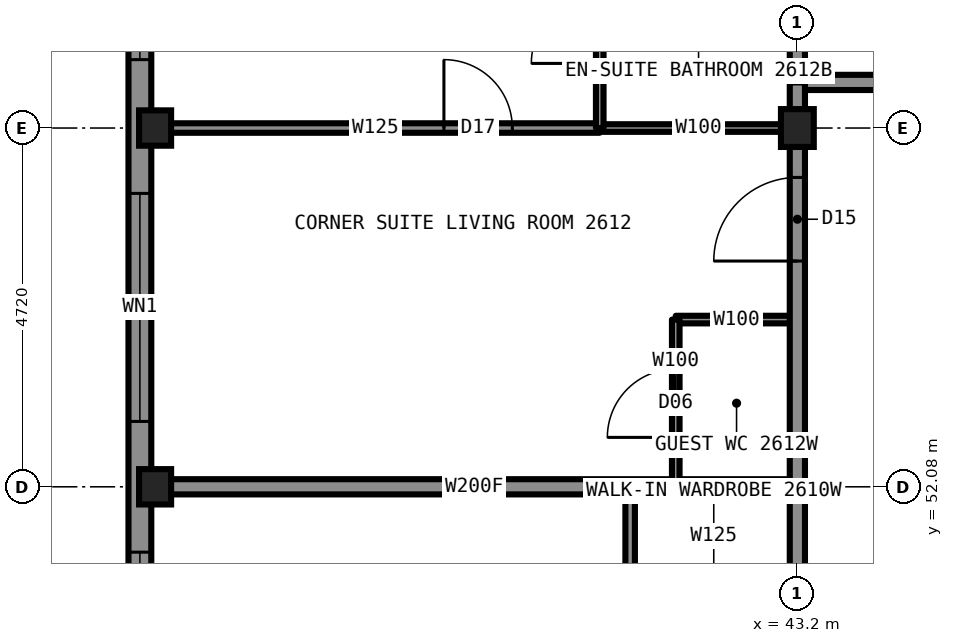
"""IFC4 building model, lengths in metres.
Left out: names, types, materials, properties, quantities, classifications, styles, units other than length and angle.
Written with IfcOpenShell. Run it as: python <this file> out.ifc"""

import sys

from ifc_helpers import new_model, si_unit, direction, frame, frame_2d, origin, origin_2d, place, context, subcontext, project, spatial, rectangle, i_section, extrude, element, fill, save


model = new_model("IFC4")
c1 = context("Model", 3, precision=1e-05, world=origin(), true_north=direction((0.0, 1.0)))
c2 = subcontext(c1, "Body", "Model", "MODEL_VIEW")
j1 = project(units=[si_unit("LENGTHUNIT", "METRE"), si_unit("PLANEANGLEUNIT", "RADIAN")], contexts=[c1])
p1 = place(None, origin())
s1 = spatial("IfcSite", under=j1, at=p1, CompositionType="ELEMENT")
p2 = place(p1, origin())
s2 = spatial("IfcBuilding", under=s1, at=p2, CompositionType="ELEMENT")
p3 = place(p2, frame((0.0, 0.0, 93.4)))
s3 = spatial("IfcBuildingStorey", under=s2, at=p3, CompositionType="ELEMENT", Elevation=93.4)
for number, where, z_axis, x_axis in (
    (1, (34.75, 52.08, 0.0), (0.0, 0.0, 1.0), (1.0, 0.0, 0.0)),
    (2, (34.75, 56.8, 0.0), (0.0, 0.0, 1.0), (1.0, 0.0, 0.0)),
):
    element("IfcColumn", number, at=place(p3, frame(where, z_axis=z_axis, x_axis=x_axis)), inside=s3, PredefinedType="COLUMN", context=c2, shape_type="SweptSolid", body=[
        extrude(i_section(OverallWidth=0.442, OverallDepth=0.531, WebThickness=0.066, FlangeThickness=0.106, at=origin_2d()), origin(), (0.0, 0.0, 1.0), 3.5),
    ])
p4 = place(p3, frame((43.2, 56.8, 0.0), z_axis=(0.0, 0.0, 1.0), x_axis=(1.0, 0.0, 0.0)))
e3 = element("IfcColumn", 3, at=p4, inside=s3, PredefinedType="COLUMN", context=c2, shape_type="SweptSolid", body=[
    extrude(i_section(OverallWidth=0.432, OverallDepth=0.498, WebThickness=0.056, FlangeThickness=0.089, at=origin_2d()), origin(), (0.0, 0.0, 1.0), 3.5),
])
p5 = place(p3, frame((40.6, 56.8, 0.0), z_axis=(0.0, 0.0, 1.0), x_axis=(1.0, 0.0, 0.0)))
e4 = element("IfcWall", 4, at=p5, inside=s3, PredefinedType="PARTITIONING", context=c2, shape_type="SweptSolid", body=[
    extrude(rectangle(XDim=2.6, YDim=0.1, at=frame_2d((1.3, 0.0))), origin(), (0.0, 0.0, 1.0), 2.573),
])
p6 = place(p3, frame((34.7, 56.8, 0.0), z_axis=(0.0, 0.0, 1.0), x_axis=(1.0, 0.0, 0.0)))
e5 = element("IfcWall", 5, at=p6, inside=s3, PredefinedType="PARTITIONING", context=c2, shape_type="SweptSolid", body=[
    extrude(rectangle(XDim=5.9, YDim=0.125, at=frame_2d((2.95, 0.0))), origin(), (0.0, 0.0, 1.0), 2.573),
])
p7 = place(p6, frame((3.85, 0.0, 0.0)))
e6 = element("IfcOpeningElement", 6, at=p7, cuts=e5, PredefinedType="OPENING", context=c2, shape_type="SweptSolid", body=[
    extrude(rectangle(XDim=0.9, YDim=2.2, at=frame_2d((0.45, 1.1))), frame((0.0, 0.073, 0.0), z_axis=(0.0, -1.0, 0.0), x_axis=(1.0, 0.0, 0.0)), (0.0, 0.0, 1.0), 0.145),
])
p8 = place(p3, frame((43.2, 57.4, 0.0), z_axis=(0.0, 0.0, 1.0), x_axis=(1.0, 0.0, 0.0)))
e7 = element("IfcWall", 7, at=p8, inside=s3, PredefinedType="PARTITIONING", context=c2, shape_type="SweptSolid", body=[
    extrude(rectangle(XDim=23.6, YDim=0.2, at=frame_2d((11.8, 0.0))), origin(), (0.0, 0.0, 1.0), 3.33),
])
p9 = place(p8, frame((3.0, 0.0, 0.0)))
e8 = element("IfcOpeningElement", 8, at=p9, cuts=e7, PredefinedType="OPENING", context=c2, shape_type="SweptSolid", body=[
    extrude(rectangle(XDim=1.0, YDim=2.2, at=frame_2d((0.5, 1.1))), frame((0.0, 0.11, 0.0), z_axis=(0.0, -1.0, 0.0), x_axis=(1.0, 0.0, 0.0)), (0.0, 0.0, 1.0), 0.22),
])
p10 = place(p8, frame((9.84, 0.0, 0.0)))
e9 = element("IfcOpeningElement", 9, at=p10, cuts=e7, PredefinedType="OPENING", context=c2, shape_type="SweptSolid", body=[
    extrude(rectangle(XDim=1.0, YDim=2.2, at=frame_2d((0.5, 1.1))), frame((0.0, 0.11, 0.0), z_axis=(0.0, -1.0, 0.0), x_axis=(1.0, 0.0, 0.0)), (0.0, 0.0, 1.0), 0.22),
])
p11 = place(p8, frame((16.71, 0.0, 0.0)))
e10 = element("IfcOpeningElement", 10, at=p11, cuts=e7, PredefinedType="OPENING", context=c2, shape_type="SweptSolid", body=[
    extrude(rectangle(XDim=1.0, YDim=2.2, at=frame_2d((0.5, 1.1))), frame((0.0, 0.11, 0.0), z_axis=(0.0, -1.0, 0.0), x_axis=(1.0, 0.0, 0.0)), (0.0, 0.0, 1.0), 0.22),
])
p12 = place(p8, frame((19.28, 0.0, 0.0)))
e11 = element("IfcOpeningElement", 11, at=p12, cuts=e7, PredefinedType="OPENING", context=c2, shape_type="SweptSolid", body=[
    extrude(rectangle(XDim=1.0, YDim=2.2, at=frame_2d((0.5, 1.1))), frame((0.0, 0.11, 0.0), z_axis=(0.0, -1.0, 0.0), x_axis=(1.0, 0.0, 0.0)), (0.0, 0.0, 1.0), 0.22),
])
p13 = place(p3, frame((34.7, 52.08, 0.0), z_axis=(0.0, 0.0, 1.0), x_axis=(1.0, 0.0, 0.0)))
e12 = element("IfcWall", 12, at=p13, inside=s3, PredefinedType="PARTITIONING", context=c2, shape_type="SweptSolid", body=[
    extrude(rectangle(XDim=8.5, YDim=0.2, at=frame_2d((4.25, 0.0))), origin(), (0.0, 0.0, 1.0), 2.573),
])
p14 = place(p3, frame((41.6, 54.28, 0.0), z_axis=(0.0, 0.0, 1.0), x_axis=(1.0, 0.0, 0.0)))
e13 = element("IfcWall", 13, at=p14, inside=s3, PredefinedType="PARTITIONING", context=c2, shape_type="SweptSolid", body=[
    extrude(rectangle(XDim=1.6, YDim=0.1, at=frame_2d((0.8, 0.0))), origin(), (0.0, 0.0, 1.0), 3.33),
])
p15 = place(p3, frame((43.2, 33.22, 0.0), z_axis=(0.0, 0.0, 1.0), x_axis=(0.0, 1.0, 0.0)))
e14 = element("IfcWall", 14, at=p15, inside=s3, PredefinedType="PARTITIONING", context=c2, shape_type="SweptSolid", body=[
    extrude(rectangle(XDim=23.56, YDim=0.2, at=frame_2d((11.78, 0.0))), origin(), (0.0, 0.0, 1.0), 3.33),
])
p16 = place(p15, frame((16.4, 0.0, 0.0)))
e15 = element("IfcOpeningElement", 15, at=p16, cuts=e14, PredefinedType="OPENING", context=c2, shape_type="SweptSolid", body=[
    extrude(rectangle(XDim=1.0, YDim=2.2, at=frame_2d((0.5, 1.1))), frame((0.0, 0.11, 0.0), z_axis=(0.0, -1.0, 0.0), x_axis=(1.0, 0.0, 0.0)), (0.0, 0.0, 1.0), 0.22),
])
p17 = place(p15, frame((21.83, 0.0, 0.0)))
e16 = element("IfcOpeningElement", 16, at=p17, cuts=e14, PredefinedType="OPENING", context=c2, shape_type="SweptSolid", body=[
    extrude(rectangle(XDim=1.1, YDim=2.2, at=frame_2d((0.55, 1.1))), frame((0.0, 0.11, 0.0), z_axis=(0.0, -1.0, 0.0), x_axis=(1.0, 0.0, 0.0)), (0.0, 0.0, 1.0), 0.22),
])
p18 = place(p15, frame((0.63, 0.0, 0.0)))
e17 = element("IfcOpeningElement", 17, at=p18, cuts=e14, PredefinedType="OPENING", context=c2, shape_type="SweptSolid", body=[
    extrude(rectangle(XDim=1.1, YDim=2.2, at=frame_2d((0.55, 1.1))), frame((0.0, 0.11, 0.0), z_axis=(0.0, -1.0, 0.0), x_axis=(1.0, 0.0, 0.0)), (0.0, 0.0, 1.0), 0.22),
])
p19 = place(p15, frame((7.45, 0.0, 0.0)))
e18 = element("IfcOpeningElement", 18, at=p19, cuts=e14, PredefinedType="OPENING", context=c2, shape_type="SweptSolid", body=[
    extrude(rectangle(XDim=2.0, YDim=2.4, at=frame_2d((1.0, 1.2))), frame((0.0, 0.11, 0.0), z_axis=(0.0, -1.0, 0.0), x_axis=(1.0, 0.0, 0.0)), (0.0, 0.0, 1.0), 0.22),
])
p20 = place(p15, frame((5.4, 0.0, 0.0)))
e19 = element("IfcOpeningElement", 19, at=p20, cuts=e14, PredefinedType="OPENING", context=c2, shape_type="SweptSolid", body=[
    extrude(rectangle(XDim=1.0, YDim=2.1, at=frame_2d((0.5, 1.05))), frame((0.0, 0.11, 0.0), z_axis=(0.0, -1.0, 0.0), x_axis=(1.0, 0.0, 0.0)), (0.0, 0.0, 1.0), 0.22),
])
p21 = place(p3, frame((43.2, 57.4, 0.0), z_axis=(0.0, 0.0, 1.0), x_axis=(0.0, 1.0, 0.0)))
e20 = element("IfcWall", 20, at=p21, inside=s3, PredefinedType="PARTITIONING", context=c2, shape_type="SweptSolid", body=[
    extrude(rectangle(XDim=7.9, YDim=0.2, at=frame_2d((3.95, 0.0))), origin(), (0.0, 0.0, 1.0), 2.573),
])
p22 = place(p3, frame((41.6, 52.08, 0.0), z_axis=(0.0, 0.0, 1.0), x_axis=(0.0, 1.0, 0.0)))
e21 = element("IfcWall", 21, at=p22, inside=s3, PredefinedType="PARTITIONING", context=c2, shape_type="SweptSolid", body=[
    extrude(rectangle(XDim=2.2, YDim=0.1, at=frame_2d((1.1, 0.0))), origin(), (0.0, 0.0, 1.0), 3.33),
])
p23 = place(p22, frame((0.65, 0.0, 0.0)))
e22 = element("IfcOpeningElement", 22, at=p23, cuts=e21, PredefinedType="OPENING", context=c2, shape_type="SweptSolid", body=[
    extrude(rectangle(XDim=0.9, YDim=2.1, at=frame_2d((0.45, 1.05))), frame((0.0, 0.06, 0.0), z_axis=(0.0, -1.0, 0.0), x_axis=(1.0, 0.0, 0.0)), (0.0, 0.0, 1.0), 0.12),
])
p24 = place(p3, frame((41.0, 50.88, 0.0), z_axis=(0.0, 0.0, 1.0), x_axis=(0.0, 1.0, 0.0)))
e23 = element("IfcWall", 23, at=p24, inside=s3, PredefinedType="PARTITIONING", context=c2, shape_type="SweptSolid", body=[
    extrude(rectangle(XDim=1.2, YDim=0.125, at=frame_2d((0.6, 0.0))), origin(), (0.0, 0.0, 1.0), 3.33),
])
p25 = place(p3, frame((40.6, 56.8, 0.0), z_axis=(0.0, 0.0, 1.0), x_axis=(0.0, 1.0, 0.0)))
e24 = element("IfcWall", 24, at=p25, inside=s3, PredefinedType="PARTITIONING", context=c2, shape_type="SweptSolid", body=[
    extrude(rectangle(XDim=2.6, YDim=0.1, at=frame_2d((1.3, 0.0))), origin(), (0.0, 0.0, 1.0), 3.33),
])
p26 = place(p25, frame((0.85, 0.0, 0.0)))
e25 = element("IfcOpeningElement", 25, at=p26, cuts=e24, PredefinedType="OPENING", context=c2, shape_type="SweptSolid", body=[
    extrude(rectangle(XDim=0.9, YDim=2.1, at=frame_2d((0.45, 1.05))), frame((0.0, 0.06, 0.0), z_axis=(0.0, -1.0, 0.0), x_axis=(1.0, 0.0, 0.0)), (0.0, 0.0, 1.0), 0.12),
])
p27 = place(p3, frame((34.55, 60.1, 0.0), z_axis=(0.0, 0.0, 1.0), x_axis=(0.0, -1.0, 0.0)))
e26 = element("IfcWall", 26, at=p27, inside=s3, PredefinedType="SOLIDWALL", context=c2, shape_type="SweptSolid", body=[
    extrude(rectangle(XDim=30.2, YDim=0.3, at=frame_2d((15.1, 0.0))), origin(), (0.0, 0.0, 1.0), 2.83),
])
p28 = place(p27, frame((0.85, 0.0, 0.5)))
e27 = element("IfcOpeningElement", 27, at=p28, cuts=e26, PredefinedType="OPENING", context=c2, shape_type="SweptSolid", body=[
    extrude(rectangle(XDim=1.6, YDim=2.0, at=frame_2d((0.8, 1.0))), frame((0.0, 0.16, 0.0), z_axis=(0.0, -1.0, 0.0), x_axis=(1.0, 0.0, 0.0)), (0.0, 0.0, 1.0), 0.32),
])
p29 = place(p27, frame((4.16, 0.0, 0.5)))
e28 = element("IfcOpeningElement", 28, at=p29, cuts=e26, PredefinedType="OPENING", context=c2, shape_type="SweptSolid", body=[
    extrude(rectangle(XDim=3.0, YDim=2.0, at=frame_2d((1.5, 1.0))), frame((0.0, 0.16, 0.0), z_axis=(0.0, -1.0, 0.0), x_axis=(1.0, 0.0, 0.0)), (0.0, 0.0, 1.0), 0.32),
])
p30 = place(p27, frame((8.88, 0.0, 0.5)))
e29 = element("IfcOpeningElement", 29, at=p30, cuts=e26, PredefinedType="OPENING", context=c2, shape_type="SweptSolid", body=[
    extrude(rectangle(XDim=3.0, YDim=2.0, at=frame_2d((1.5, 1.0))), frame((0.0, 0.16, 0.0), z_axis=(0.0, -1.0, 0.0), x_axis=(1.0, 0.0, 0.0)), (0.0, 0.0, 1.0), 0.32),
])
p31 = place(p27, frame((13.6, 0.0, 0.5)))
e30 = element("IfcOpeningElement", 30, at=p31, cuts=e26, PredefinedType="OPENING", context=c2, shape_type="SweptSolid", body=[
    extrude(rectangle(XDim=3.0, YDim=2.0, at=frame_2d((1.5, 1.0))), frame((0.0, 0.16, 0.0), z_axis=(0.0, -1.0, 0.0), x_axis=(1.0, 0.0, 0.0)), (0.0, 0.0, 1.0), 0.32),
])
p32 = place(p27, frame((18.32, 0.0, 0.5)))
e31 = element("IfcOpeningElement", 31, at=p32, cuts=e26, PredefinedType="OPENING", context=c2, shape_type="SweptSolid", body=[
    extrude(rectangle(XDim=3.0, YDim=2.0, at=frame_2d((1.5, 1.0))), frame((0.0, 0.16, 0.0), z_axis=(0.0, -1.0, 0.0), x_axis=(1.0, 0.0, 0.0)), (0.0, 0.0, 1.0), 0.32),
])
p33 = place(p27, frame((23.04, 0.0, 0.5)))
e32 = element("IfcOpeningElement", 32, at=p33, cuts=e26, PredefinedType="OPENING", context=c2, shape_type="SweptSolid", body=[
    extrude(rectangle(XDim=3.0, YDim=2.0, at=frame_2d((1.5, 1.0))), frame((0.0, 0.16, 0.0), z_axis=(0.0, -1.0, 0.0), x_axis=(1.0, 0.0, 0.0)), (0.0, 0.0, 1.0), 0.32),
])
p34 = place(p27, frame((27.75, 0.0, 0.5)))
e33 = element("IfcOpeningElement", 33, at=p34, cuts=e26, PredefinedType="OPENING", context=c2, shape_type="SweptSolid", body=[
    extrude(rectangle(XDim=1.6, YDim=2.0, at=frame_2d((0.8, 1.0))), frame((0.0, 0.16, 0.0), z_axis=(0.0, -1.0, 0.0), x_axis=(1.0, 0.0, 0.0)), (0.0, 0.0, 1.0), 0.32),
])
p35 = place(p3, frame((43.2, 56.78, 0.0), z_axis=(0.0, 0.0, 1.0), x_axis=(0.0, 1.0, 0.0)))
e34 = element("IfcWall", 34, at=p35, inside=s3, PredefinedType="PARTITIONING", context=c2, shape_type="SweptSolid", body=[
    extrude(rectangle(XDim=0.62, YDim=0.2, at=frame_2d((0.31, 0.0))), origin(), (0.0, 0.0, 1.0), 2.573),
])
p36 = place(p17, origin())
e35 = element("IfcDoor", 35, at=p36, inside=s3, OperationType="SINGLE_SWING_LEFT", PredefinedType="DOOR", context=c2, shape_type="SweptSolid", body=[
    extrude(rectangle(XDim=1.1, YDim=2.2, at=frame_2d((0.55, 1.1))), frame((0.0, 0.025, 0.0), z_axis=(0.0, -1.0, 0.0), x_axis=(1.0, 0.0, 0.0)), (0.0, 0.0, 1.0), 0.05),
])
fill(e16, e35)
p37 = place(p26, origin())
e36 = element("IfcDoor", 36, at=p37, inside=s3, OperationType="SINGLE_SWING_RIGHT", PredefinedType="DOOR", context=c2, shape_type="SweptSolid", body=[
    extrude(rectangle(XDim=0.9, YDim=2.1, at=frame_2d((0.45, 1.05))), frame((0.0, 0.025, 0.0), z_axis=(0.0, -1.0, 0.0), x_axis=(1.0, 0.0, 0.0)), (0.0, 0.0, 1.0), 0.05),
])
fill(e25, e36)
p38 = place(p7, origin())
e37 = element("IfcDoor", 37, at=p38, inside=s3, OperationType="SINGLE_SWING_LEFT", PredefinedType="DOOR", context=c2, shape_type="SweptSolid", body=[
    extrude(rectangle(XDim=0.9, YDim=2.2, at=frame_2d((0.45, 1.1))), frame((0.0, 0.025, 0.0), z_axis=(0.0, -1.0, 0.0), x_axis=(1.0, 0.0, 0.0)), (0.0, 0.0, 1.0), 0.05),
])
fill(e6, e37)
p39 = place(p23, origin())
e38 = element("IfcDoor", 38, at=p39, inside=s3, OperationType="SINGLE_SWING_LEFT", PredefinedType="DOOR", context=c2, shape_type="SweptSolid", body=[
    extrude(rectangle(XDim=0.9, YDim=2.1, at=frame_2d((0.45, 1.05))), frame((0.0, 0.025, 0.0), z_axis=(0.0, -1.0, 0.0), x_axis=(1.0, 0.0, 0.0)), (0.0, 0.0, 1.0), 0.05),
])
fill(e22, e38)
p40 = place(p28, origin())
e39 = element("IfcWindow", 39, at=p40, inside=s3, PartitioningType="SINGLE_PANEL", PredefinedType="WINDOW", context=c2, shape_type="SweptSolid", body=[
    extrude(rectangle(XDim=1.6, YDim=2.0, at=frame_2d((0.8, 1.0))), frame((0.0, 0.03, 0.0), z_axis=(0.0, -1.0, 0.0), x_axis=(1.0, 0.0, 0.0)), (0.0, 0.0, 1.0), 0.06),
])
fill(e27, e39)
p41 = place(p29, origin())
e40 = element("IfcWindow", 40, at=p41, inside=s3, PartitioningType="SINGLE_PANEL", PredefinedType="WINDOW", context=c2, shape_type="SweptSolid", body=[
    extrude(rectangle(XDim=3.0, YDim=2.0, at=frame_2d((1.5, 1.0))), frame((0.0, 0.03, 0.0), z_axis=(0.0, -1.0, 0.0), x_axis=(1.0, 0.0, 0.0)), (0.0, 0.0, 1.0), 0.06),
])
fill(e28, e40)
p42 = place(p30, origin())
e41 = element("IfcWindow", 41, at=p42, inside=s3, PartitioningType="SINGLE_PANEL", PredefinedType="WINDOW", context=c2, shape_type="SweptSolid", body=[
    extrude(rectangle(XDim=3.0, YDim=2.0, at=frame_2d((1.5, 1.0))), frame((0.0, 0.03, 0.0), z_axis=(0.0, -1.0, 0.0), x_axis=(1.0, 0.0, 0.0)), (0.0, 0.0, 1.0), 0.06),
])
fill(e29, e41)
save(model, sys.argv[1])
